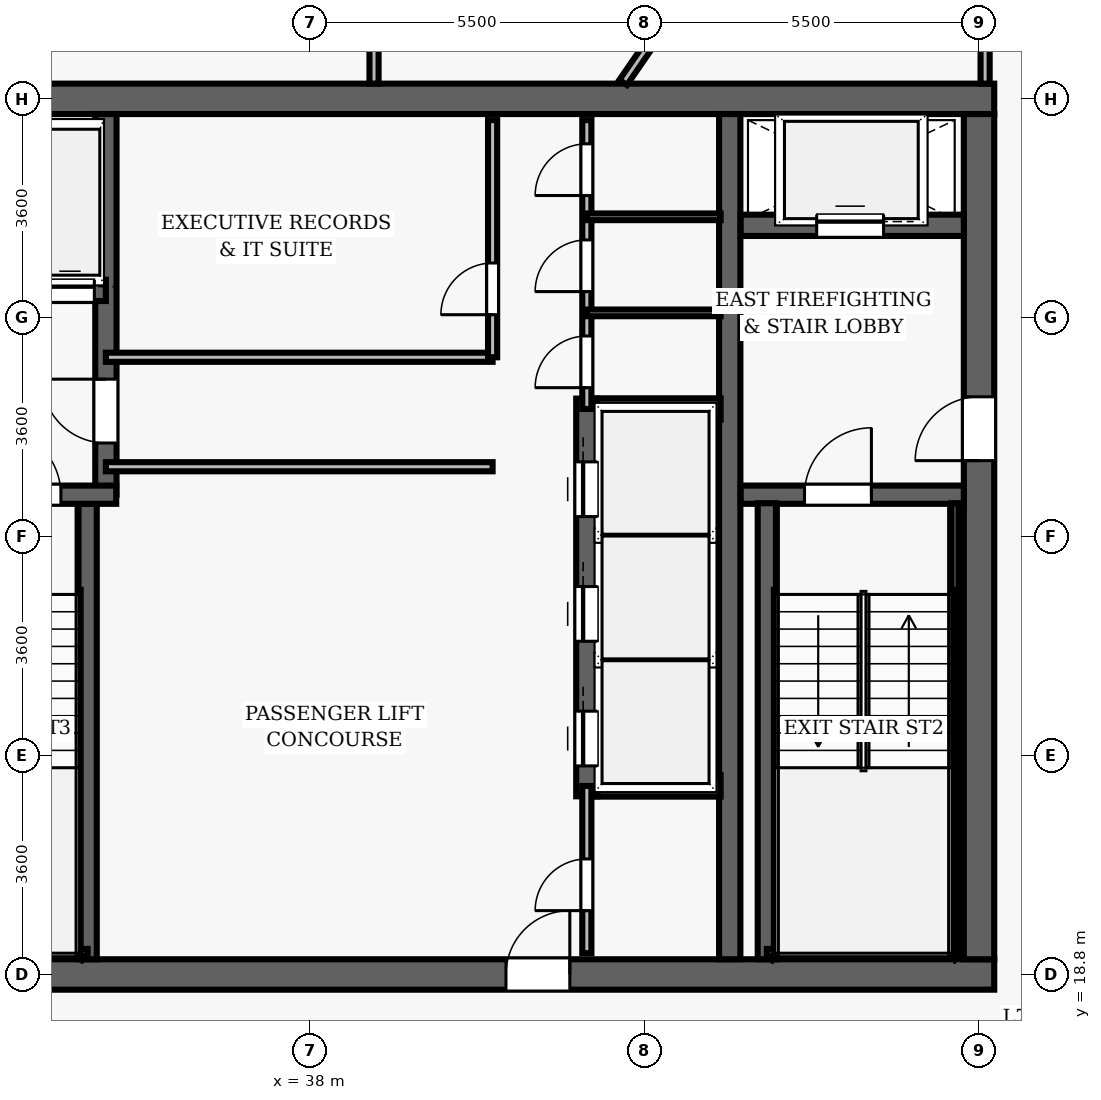
"""IFC4 building model, lengths in metres.
Left out: names, types, materials, properties, quantities, classifications, styles, units other than length and angle.
Written with IfcOpenShell. Run it as: python <this file> out.ifc"""

import sys

from ifc_helpers import new_model, si_unit, direction, frame, frame_2d, origin, place, context, subcontext, project, spatial, rectangle, extrude, element, fill, save


model = new_model("IFC4")
c1 = context("Model", 3, precision=1e-05, world=origin(), true_north=direction((0.0, 1.0)))
c2 = subcontext(c1, "Body", "Model", "MODEL_VIEW")
j1 = project(units=[si_unit("LENGTHUNIT", "METRE"), si_unit("PLANEANGLEUNIT", "RADIAN")], contexts=[c1])
p1 = place(None, origin())
s1 = spatial("IfcSite", under=j1, at=p1, CompositionType="ELEMENT")
p2 = place(p1, origin())
s2 = spatial("IfcBuilding", under=s1, at=p2, CompositionType="ELEMENT")
p3 = place(p2, frame((0.0, 0.0, 299.8)))
s3 = spatial("IfcBuildingStorey", under=s2, at=p3, CompositionType="ELEMENT", Elevation=299.8)
p4 = place(p3, frame((26.75, 18.8, 0.0), z_axis=(0.0, 0.0, 1.0), x_axis=(1.0, 0.0, 0.0)))
e1 = element("IfcWall", 1, at=p4, inside=s3, PredefinedType="SHEAR", context=c2, shape_type="SweptSolid", body=[
    extrude(rectangle(XDim=22.5, YDim=0.5, at=frame_2d((11.25, 0.0))), origin(), (0.0, 0.0, 1.0), 3.85),
])
p5 = place(p4, frame((14.47, 0.0, 0.0)))
e2 = element("IfcOpeningElement", 2, at=p5, cuts=e1, PredefinedType="OPENING", context=c2, shape_type="SweptSolid", body=[
    extrude(rectangle(XDim=1.05, YDim=2.15, at=frame_2d((0.525, 1.075))), frame((0.0, 0.26, 0.0), z_axis=(0.0, -1.0, 0.0), x_axis=(1.0, 0.0, 0.0)), (0.0, 0.0, 1.0), 0.52),
])
p6 = place(p3, frame((26.75, 33.2, 0.0), z_axis=(0.0, 0.0, 1.0), x_axis=(1.0, 0.0, 0.0)))
e3 = element("IfcWall", 3, at=p6, inside=s3, PredefinedType="SHEAR", context=c2, shape_type="SweptSolid", body=[
    extrude(rectangle(XDim=22.5, YDim=0.5, at=frame_2d((11.25, 0.0))), origin(), (0.0, 0.0, 1.0), 3.85),
])
p7 = place(p3, frame((49.0, 19.05, 0.0), z_axis=(0.0, 0.0, 1.0), x_axis=(0.0, 1.0, 0.0)))
e4 = element("IfcWall", 4, at=p7, inside=s3, PredefinedType="SHEAR", context=c2, shape_type="SweptSolid", body=[
    extrude(rectangle(XDim=13.9, YDim=0.5, at=frame_2d((6.95, 0.0))), origin(), (0.0, 0.0, 1.0), 3.85),
])
p8 = place(p7, frame((8.2, 0.0, 0.0)))
e5 = element("IfcOpeningElement", 5, at=p8, cuts=e4, PredefinedType="OPENING", context=c2, shape_type="SweptSolid", body=[
    extrude(rectangle(XDim=1.05, YDim=2.15, at=frame_2d((0.525, 1.075))), frame((0.0, 0.26, 0.0), z_axis=(0.0, -1.0, 0.0), x_axis=(1.0, 0.0, 0.0)), (0.0, 0.0, 1.0), 0.52),
])
p9 = place(p3, frame((44.9, 19.05, 0.0), z_axis=(0.0, 0.0, 1.0), x_axis=(0.0, 1.0, 0.0)))
e6 = element("IfcWall", 6, at=p9, inside=s3, PredefinedType="SHEAR", context=c2, shape_type="SweptSolid", body=[
    extrude(rectangle(XDim=13.9, YDim=0.35, at=frame_2d((6.95, 0.0))), origin(), (0.0, 0.0, 1.0), 3.85),
])
p10 = place(p3, frame((45.08, 26.69, 0.0), z_axis=(0.0, 0.0, 1.0), x_axis=(1.0, 0.0, 0.0)))
e7 = element("IfcWall", 7, at=p10, inside=s3, PredefinedType="SHEAR", context=c2, shape_type="SweptSolid", body=[
    extrude(rectangle(XDim=3.67, YDim=0.3, at=frame_2d((1.835, 0.0))), origin(), (0.0, 0.0, 1.0), 3.85),
])
p11 = place(p10, frame((1.05, 0.0, 0.0)))
e8 = element("IfcOpeningElement", 8, at=p11, cuts=e7, PredefinedType="OPENING", context=c2, shape_type="SweptSolid", body=[
    extrude(rectangle(XDim=1.1, YDim=2.15, at=frame_2d((0.55, 1.075))), frame((0.0, 0.16, 0.0), z_axis=(0.0, -1.0, 0.0), x_axis=(1.0, 0.0, 0.0)), (0.0, 0.0, 1.0), 0.32),
])
p12 = place(p3, frame((45.51, 19.05, 0.0), z_axis=(0.0, 0.0, 1.0), x_axis=(0.0, 1.0, 0.0)))
e9 = element("IfcWall", 9, at=p12, inside=s3, PredefinedType="SHEAR", context=c2, shape_type="SweptSolid", body=[
    extrude(rectangle(XDim=7.5, YDim=0.3, at=frame_2d((3.75, 0.0))), origin(), (0.0, 0.0, 1.0), 3.85),
])
p13 = place(p3, frame((48.605, 19.1, 0.0), z_axis=(0.0, 0.0, 1.0), x_axis=(0.0, 1.0, 0.0)))
e10 = element("IfcWall", 10, at=p13, inside=s3, PredefinedType="SHEAR", context=c2, shape_type="SweptSolid", body=[
    extrude(rectangle(XDim=7.45, YDim=0.12, at=frame_2d((3.725, 0.0))), origin(), (0.0, 0.0, 1.0), 3.85),
])
p14 = place(p3, frame((45.51, 19.16, 0.0), z_axis=(0.0, 0.0, 1.0), x_axis=(1.0, 0.0, 0.0)))
e11 = element("IfcWall", 11, at=p14, inside=s3, PredefinedType="SHEAR", context=c2, shape_type="SweptSolid", body=[
    extrude(rectangle(XDim=3.095, YDim=0.12, at=frame_2d((1.547, 0.0))), origin(), (0.0, 0.0, 1.0), 3.85),
])
p15 = place(p3, frame((45.08, 31.12, 0.0), z_axis=(0.0, 0.0, 1.0), x_axis=(1.0, 0.0, 0.0)))
e12 = element("IfcWall", 12, at=p15, inside=s3, PredefinedType="SHEAR", context=c2, shape_type="SweptSolid", body=[
    extrude(rectangle(XDim=3.67, YDim=0.35, at=frame_2d((1.835, 0.0))), origin(), (0.0, 0.0, 1.0), 3.04),
])
p16 = place(p15, frame((1.25, 0.0, 0.0)))
e13 = element("IfcOpeningElement", 13, at=p16, cuts=e12, PredefinedType="OPENING", context=c2, shape_type="SweptSolid", body=[
    extrude(rectangle(XDim=1.1, YDim=2.15, at=frame_2d((0.55, 1.075))), frame((0.0, 0.185, 0.0), z_axis=(0.0, -1.0, 0.0), x_axis=(1.0, 0.0, 0.0)), (0.0, 0.0, 1.0), 0.37),
])
p17 = place(p3, frame((34.34, 19.05, 0.0), z_axis=(0.0, 0.0, 1.0), x_axis=(0.0, 1.0, 0.0)))
e14 = element("IfcWall", 14, at=p17, inside=s3, PredefinedType="SHEAR", context=c2, shape_type="SweptSolid", body=[
    extrude(rectangle(XDim=7.5, YDim=0.3, at=frame_2d((3.75, 0.0))), origin(), (0.0, 0.0, 1.0), 3.85),
])
p18 = place(p3, frame((34.64, 26.69, 0.0), z_axis=(0.0, 0.0, 1.0), x_axis=(0.0, 1.0, 0.0)))
e15 = element("IfcWall", 15, at=p18, inside=s3, PredefinedType="SHEAR", context=c2, shape_type="SweptSolid", body=[
    extrude(rectangle(XDim=6.26, YDim=0.35, at=frame_2d((3.13, 0.0))), origin(), (0.0, 0.0, 1.0), 3.85),
])
p19 = place(p18, frame((0.85, 0.0, 0.0)))
e16 = element("IfcOpeningElement", 16, at=p19, cuts=e15, PredefinedType="OPENING", context=c2, shape_type="SweptSolid", body=[
    extrude(rectangle(XDim=1.05, YDim=2.15, at=frame_2d((0.525, 1.075))), frame((0.0, 0.185, 0.0), z_axis=(0.0, -1.0, 0.0), x_axis=(1.0, 0.0, 0.0)), (0.0, 0.0, 1.0), 0.37),
])
p20 = place(p3, frame((31.25, 26.69, 0.0), z_axis=(0.0, 0.0, 1.0), x_axis=(1.0, 0.0, 0.0)))
e17 = element("IfcWall", 17, at=p20, inside=s3, PredefinedType="SHEAR", context=c2, shape_type="SweptSolid", body=[
    extrude(rectangle(XDim=3.56, YDim=0.3, at=frame_2d((1.78, 0.0))), origin(), (0.0, 0.0, 1.0), 3.85),
])
p21 = place(p20, frame((1.55, 0.0, 0.0)))
e18 = element("IfcOpeningElement", 18, at=p21, cuts=e17, PredefinedType="OPENING", context=c2, shape_type="SweptSolid", body=[
    extrude(rectangle(XDim=1.1, YDim=2.15, at=frame_2d((0.55, 1.075))), frame((0.0, 0.16, 0.0), z_axis=(0.0, -1.0, 0.0), x_axis=(1.0, 0.0, 0.0)), (0.0, 0.0, 1.0), 0.32),
])
p22 = place(p3, frame((31.3, 19.16, 0.0), z_axis=(0.0, 0.0, 1.0), x_axis=(1.0, 0.0, 0.0)))
e19 = element("IfcWall", 19, at=p22, inside=s3, PredefinedType="SHEAR", context=c2, shape_type="SweptSolid", body=[
    extrude(rectangle(XDim=3.04, YDim=0.12, at=frame_2d((1.52, 0.0))), origin(), (0.0, 0.0, 1.0), 3.85),
])
p23 = place(p3, frame((32.23, 30.05, 0.0), z_axis=(0.0, 0.0, 1.0), x_axis=(1.0, 0.0, 0.0)))
e20 = element("IfcWall", 20, at=p23, inside=s3, PredefinedType="SHEAR", context=c2, shape_type="SweptSolid", body=[
    extrude(rectangle(XDim=2.41, YDim=0.35, at=frame_2d((1.205, 0.0))), origin(), (0.0, 0.0, 1.0), 3.04),
])
p24 = place(p23, frame((0.42, 0.0, 0.0)))
e21 = element("IfcOpeningElement", 21, at=p24, cuts=e20, PredefinedType="OPENING", context=c2, shape_type="SweptSolid", body=[
    extrude(rectangle(XDim=0.8, YDim=2.15, at=frame_2d((0.4, 1.075))), frame((0.0, 0.185, 0.0), z_axis=(0.0, -1.0, 0.0), x_axis=(1.0, 0.0, 0.0)), (0.0, 0.0, 1.0), 0.37),
])
p25 = place(p23, frame((1.42, 0.0, 0.0)))
e22 = element("IfcOpeningElement", 22, at=p25, cuts=e20, PredefinedType="OPENING", context=c2, shape_type="SweptSolid", body=[
    extrude(rectangle(XDim=0.8, YDim=2.15, at=frame_2d((0.4, 1.075))), frame((0.0, 0.185, 0.0), z_axis=(0.0, -1.0, 0.0), x_axis=(1.0, 0.0, 0.0)), (0.0, 0.0, 1.0), 0.37),
])
p26 = place(p3, frame((42.55, 21.73, 0.0), z_axis=(0.0, 0.0, 1.0), x_axis=(0.0, 1.0, 0.0)))
e23 = element("IfcWall", 23, at=p26, inside=s3, PredefinedType="SHEAR", context=c2, shape_type="SweptSolid", body=[
    extrude(rectangle(XDim=6.54, YDim=0.35, at=frame_2d((3.27, 0.0))), origin(), (0.0, 0.0, 1.0), 3.04),
])
p27 = place(p26, frame((0.5, 0.0, 0.0)))
e24 = element("IfcOpeningElement", 24, at=p27, cuts=e23, PredefinedType="OPENING", context=c2, shape_type="SweptSolid", body=[
    extrude(rectangle(XDim=0.9, YDim=2.15, at=frame_2d((0.45, 1.075))), frame((0.0, 0.185, 0.0), z_axis=(0.0, -1.0, 0.0), x_axis=(1.0, 0.0, 0.0)), (0.0, 0.0, 1.0), 0.37),
])
p28 = place(p26, frame((2.55, 0.0, 0.0)))
e25 = element("IfcOpeningElement", 25, at=p28, cuts=e23, PredefinedType="OPENING", context=c2, shape_type="SweptSolid", body=[
    extrude(rectangle(XDim=0.9, YDim=2.15, at=frame_2d((0.45, 1.075))), frame((0.0, 0.185, 0.0), z_axis=(0.0, -1.0, 0.0), x_axis=(1.0, 0.0, 0.0)), (0.0, 0.0, 1.0), 0.37),
])
p29 = place(p26, frame((4.6, 0.0, 0.0)))
e26 = element("IfcOpeningElement", 26, at=p29, cuts=e23, PredefinedType="OPENING", context=c2, shape_type="SweptSolid", body=[
    extrude(rectangle(XDim=0.9, YDim=2.15, at=frame_2d((0.45, 1.075))), frame((0.0, 0.185, 0.0), z_axis=(0.0, -1.0, 0.0), x_axis=(1.0, 0.0, 0.0)), (0.0, 0.0, 1.0), 0.37),
])
for number, where, z_axis, x_axis in (
    (27, (42.72, 21.9, 0.0), (0.0, 0.0, 1.0), (1.0, 0.0, 0.0)),
    (28, (42.72, 28.1, 0.0), (0.0, 0.0, 1.0), (1.0, 0.0, 0.0)),
):
    element("IfcWall", number, at=place(p3, frame(where, z_axis=z_axis, x_axis=x_axis)), inside=s3, PredefinedType="SHEAR", context=c2, shape_type="SweptSolid", body=[
        extrude(rectangle(XDim=2.03, YDim=0.35, at=frame_2d((1.015, 0.0))), origin(), (0.0, 0.0, 1.0), 3.04),
    ])
for number, where, z_axis, x_axis in (
    (29, (34.64, 27.15, 0.0), (0.0, 0.0, 1.0), (1.0, 0.0, 0.0)),
    (30, (34.64, 28.95, 0.0), (0.0, 0.0, 1.0), (1.0, 0.0, 0.0)),
):
    element("IfcWall", number, at=place(p3, frame(where, z_axis=z_axis, x_axis=x_axis)), inside=s3, PredefinedType="PARTITIONING", context=c2, shape_type="SweptSolid", body=[
        extrude(rectangle(XDim=6.36, YDim=0.15, at=frame_2d((3.18, 0.0))), origin(), (0.0, 0.0, 1.0), 3.04),
    ])
p30 = place(p3, frame((41.0, 28.95, 0.0), z_axis=(0.0, 0.0, 1.0), x_axis=(0.0, 1.0, 0.0)))
e31 = element("IfcWall", 31, at=p30, inside=s3, PredefinedType="PARTITIONING", context=c2, shape_type="SweptSolid", body=[
    extrude(rectangle(XDim=3.9, YDim=0.15, at=frame_2d((1.95, 0.0))), origin(), (0.0, 0.0, 1.0), 3.04),
])
p31 = place(p30, frame((0.7, 0.0, 0.0)))
e32 = element("IfcOpeningElement", 32, at=p31, cuts=e31, PredefinedType="OPENING", context=c2, shape_type="SweptSolid", body=[
    extrude(rectangle(XDim=0.85, YDim=2.1, at=frame_2d((0.425, 1.05))), frame((0.0, 0.085, 0.0), z_axis=(0.0, -1.0, 0.0), x_axis=(1.0, 0.0, 0.0)), (0.0, 0.0, 1.0), 0.17),
])
p32 = place(p3, frame((42.55, 28.1, 0.0), z_axis=(0.0, 0.0, 1.0), x_axis=(0.0, 1.0, 0.0)))
e33 = element("IfcWall", 33, at=p32, inside=s3, PredefinedType="PARTITIONING", context=c2, shape_type="SweptSolid", body=[
    extrude(rectangle(XDim=4.75, YDim=0.15, at=frame_2d((2.375, 0.0))), origin(), (0.0, 0.0, 1.0), 3.04),
])
p33 = place(p32, frame((0.35, 0.0, 0.0)))
e34 = element("IfcOpeningElement", 34, at=p33, cuts=e33, PredefinedType="OPENING", context=c2, shape_type="SweptSolid", body=[
    extrude(rectangle(XDim=0.85, YDim=2.1, at=frame_2d((0.425, 1.05))), frame((0.0, 0.085, 0.0), z_axis=(0.0, -1.0, 0.0), x_axis=(1.0, 0.0, 0.0)), (0.0, 0.0, 1.0), 0.17),
])
p34 = place(p32, frame((1.93, 0.0, 0.0)))
e35 = element("IfcOpeningElement", 35, at=p34, cuts=e33, PredefinedType="OPENING", context=c2, shape_type="SweptSolid", body=[
    extrude(rectangle(XDim=0.85, YDim=2.1, at=frame_2d((0.425, 1.05))), frame((0.0, 0.085, 0.0), z_axis=(0.0, -1.0, 0.0), x_axis=(1.0, 0.0, 0.0)), (0.0, 0.0, 1.0), 0.17),
])
p35 = place(p32, frame((3.51, 0.0, 0.0)))
e36 = element("IfcOpeningElement", 36, at=p35, cuts=e33, PredefinedType="OPENING", context=c2, shape_type="SweptSolid", body=[
    extrude(rectangle(XDim=0.85, YDim=2.1, at=frame_2d((0.425, 1.05))), frame((0.0, 0.085, 0.0), z_axis=(0.0, -1.0, 0.0), x_axis=(1.0, 0.0, 0.0)), (0.0, 0.0, 1.0), 0.17),
])
for number, where, z_axis, x_axis in (
    (37, (42.55, 29.68, 0.0), (0.0, 0.0, 1.0), (1.0, 0.0, 0.0)),
    (38, (42.55, 31.26, 0.0), (0.0, 0.0, 1.0), (1.0, 0.0, 0.0)),
):
    element("IfcWall", number, at=place(p3, frame(where, z_axis=z_axis, x_axis=x_axis)), inside=s3, PredefinedType="PARTITIONING", context=c2, shape_type="SweptSolid", body=[
        extrude(rectangle(XDim=2.2, YDim=0.11, at=frame_2d((1.1, 0.0))), origin(), (0.0, 0.0, 1.0), 3.04),
    ])
p36 = place(p3, frame((42.55, 19.15, 0.0), z_axis=(0.0, 0.0, 1.0), x_axis=(0.0, 1.0, 0.0)))
e39 = element("IfcWall", 39, at=p36, inside=s3, PredefinedType="PARTITIONING", context=c2, shape_type="SweptSolid", body=[
    extrude(rectangle(XDim=2.75, YDim=0.15, at=frame_2d((1.375, 0.0))), origin(), (0.0, 0.0, 1.0), 3.04),
])
p37 = place(p36, frame((0.7, 0.0, 0.0)))
e40 = element("IfcOpeningElement", 40, at=p37, cuts=e39, PredefinedType="OPENING", context=c2, shape_type="SweptSolid", body=[
    extrude(rectangle(XDim=0.85, YDim=2.1, at=frame_2d((0.425, 1.05))), frame((0.0, 0.085, 0.0), z_axis=(0.0, -1.0, 0.0), x_axis=(1.0, 0.0, 0.0)), (0.0, 0.0, 1.0), 0.17),
])
p38 = place(p3, frame((49.1, 33.45, 0.0), z_axis=(0.0, 0.0, 1.0), x_axis=(0.0, 1.0, 0.0)))
e41 = element("IfcWall", 41, at=p38, inside=s3, PredefinedType="PARTITIONING", context=c2, shape_type="SweptSolid", body=[
    extrude(rectangle(XDim=7.95, YDim=0.15, at=frame_2d((3.975, 0.0))), origin(), (0.0, 0.0, 1.0), 3.04),
])
p39 = place(p3, frame((39.05, 33.45, 0.0), z_axis=(0.0, 0.0, 1.0), x_axis=(0.0, 1.0, 0.0)))
e42 = element("IfcWall", 42, at=p39, inside=s3, PredefinedType="PARTITIONING", context=c2, shape_type="SweptSolid", body=[
    extrude(rectangle(XDim=6.95, YDim=0.15, at=frame_2d((3.475, 0.0))), origin(), (0.0, 0.0, 1.0), 3.04),
])
p40 = place(p39, frame((0.988, 0.0, 0.0)))
e43 = element("IfcOpeningElement", 43, at=p40, cuts=e42, PredefinedType="OPENING", context=c2, shape_type="SweptSolid", body=[
    extrude(rectangle(XDim=1.5, YDim=2.2, at=frame_2d((0.75, 1.1))), frame((0.0, 0.085, 0.0), z_axis=(0.0, -1.0, 0.0), x_axis=(1.0, 0.0, 0.0)), (0.0, 0.0, 1.0), 0.17),
])
p41 = place(p3, frame((43.148, 33.47, 0.0), z_axis=(0.0, 0.0, 1.0), x_axis=(0.56742949058, 0.82342198976, 0.0)))
e44 = element("IfcWall", 44, at=p41, inside=s3, PredefinedType="PARTITIONING", context=c2, shape_type="SweptSolid", body=[
    extrude(rectangle(XDim=12.673, YDim=0.15, at=frame_2d((6.336, 0.0))), origin(), (0.0, 0.0, 1.0), 3.04),
])
p42 = place(p11, origin())
e45 = element("IfcDoor", 45, at=p42, inside=s3, OperationType="SINGLE_SWING_RIGHT", PredefinedType="DOOR", context=c2, shape_type="SweptSolid", body=[
    extrude(rectangle(XDim=1.1, YDim=2.15, at=frame_2d((0.55, 1.075))), frame((0.0, 0.025, 0.0), z_axis=(0.0, -1.0, 0.0), x_axis=(1.0, 0.0, 0.0)), (0.0, 0.0, 1.0), 0.05),
])
fill(e8, e45)
p43 = place(p8, origin())
e46 = element("IfcDoor", 46, at=p43, inside=s3, OperationType="SINGLE_SWING_LEFT", PredefinedType="DOOR", context=c2, shape_type="SweptSolid", body=[
    extrude(rectangle(XDim=1.05, YDim=2.15, at=frame_2d((0.525, 1.075))), frame((0.0, 0.025, 0.0), z_axis=(0.0, -1.0, 0.0), x_axis=(1.0, 0.0, 0.0)), (0.0, 0.0, 1.0), 0.05),
])
fill(e5, e46)
p44 = place(p21, origin())
e47 = element("IfcDoor", 47, at=p44, inside=s3, OperationType="SINGLE_SWING_LEFT", PredefinedType="DOOR", context=c2, shape_type="SweptSolid", body=[
    extrude(rectangle(XDim=1.1, YDim=2.15, at=frame_2d((0.55, 1.075))), frame((0.0, 0.025, 0.0), z_axis=(0.0, -1.0, 0.0), x_axis=(1.0, 0.0, 0.0)), (0.0, 0.0, 1.0), 0.05),
])
fill(e18, e47)
p45 = place(p5, origin())
e48 = element("IfcDoor", 48, at=p45, inside=s3, OperationType="SINGLE_SWING_RIGHT", PredefinedType="DOOR", context=c2, shape_type="SweptSolid", body=[
    extrude(rectangle(XDim=1.05, YDim=2.15, at=frame_2d((0.525, 1.075))), frame((0.0, 0.025, 0.0), z_axis=(0.0, -1.0, 0.0), x_axis=(1.0, 0.0, 0.0)), (0.0, 0.0, 1.0), 0.05),
])
fill(e2, e48)
p46 = place(p19, origin())
e49 = element("IfcDoor", 49, at=p46, inside=s3, OperationType="SINGLE_SWING_RIGHT", PredefinedType="DOOR", context=c2, shape_type="SweptSolid", body=[
    extrude(rectangle(XDim=1.05, YDim=2.15, at=frame_2d((0.525, 1.075))), frame((0.0, 0.025, 0.0), z_axis=(0.0, -1.0, 0.0), x_axis=(1.0, 0.0, 0.0)), (0.0, 0.0, 1.0), 0.05),
])
fill(e16, e49)
p47 = place(p31, origin())
e50 = element("IfcDoor", 50, at=p47, inside=s3, OperationType="SINGLE_SWING_LEFT", PredefinedType="DOOR", context=c2, shape_type="SweptSolid", body=[
    extrude(rectangle(XDim=0.85, YDim=2.1, at=frame_2d((0.425, 1.05))), frame((0.0, 0.025, 0.0), z_axis=(0.0, -1.0, 0.0), x_axis=(1.0, 0.0, 0.0)), (0.0, 0.0, 1.0), 0.05),
])
fill(e32, e50)
p48 = place(p33, origin())
e51 = element("IfcDoor", 51, at=p48, inside=s3, OperationType="SINGLE_SWING_LEFT", PredefinedType="DOOR", context=c2, shape_type="SweptSolid", body=[
    extrude(rectangle(XDim=0.85, YDim=2.1, at=frame_2d((0.425, 1.05))), frame((0.0, 0.025, 0.0), z_axis=(0.0, -1.0, 0.0), x_axis=(1.0, 0.0, 0.0)), (0.0, 0.0, 1.0), 0.05),
])
fill(e34, e51)
p49 = place(p34, origin())
e52 = element("IfcDoor", 52, at=p49, inside=s3, OperationType="SINGLE_SWING_LEFT", PredefinedType="DOOR", context=c2, shape_type="SweptSolid", body=[
    extrude(rectangle(XDim=0.85, YDim=2.1, at=frame_2d((0.425, 1.05))), frame((0.0, 0.025, 0.0), z_axis=(0.0, -1.0, 0.0), x_axis=(1.0, 0.0, 0.0)), (0.0, 0.0, 1.0), 0.05),
])
fill(e35, e52)
p50 = place(p35, origin())
e53 = element("IfcDoor", 53, at=p50, inside=s3, OperationType="SINGLE_SWING_LEFT", PredefinedType="DOOR", context=c2, shape_type="SweptSolid", body=[
    extrude(rectangle(XDim=0.85, YDim=2.1, at=frame_2d((0.425, 1.05))), frame((0.0, 0.025, 0.0), z_axis=(0.0, -1.0, 0.0), x_axis=(1.0, 0.0, 0.0)), (0.0, 0.0, 1.0), 0.05),
])
fill(e36, e53)
p51 = place(p37, origin())
e54 = element("IfcDoor", 54, at=p51, inside=s3, OperationType="SINGLE_SWING_LEFT", PredefinedType="DOOR", context=c2, shape_type="SweptSolid", body=[
    extrude(rectangle(XDim=0.85, YDim=2.1, at=frame_2d((0.425, 1.05))), frame((0.0, 0.025, 0.0), z_axis=(0.0, -1.0, 0.0), x_axis=(1.0, 0.0, 0.0)), (0.0, 0.0, 1.0), 0.05),
])
fill(e40, e54)
p52 = place(p27, origin())
e55 = element("IfcDoor", 55, at=p52, inside=s3, OperationType="SLIDING_TO_LEFT", PredefinedType="DOOR", context=c2, shape_type="SweptSolid", body=[
    extrude(rectangle(XDim=0.9, YDim=2.15, at=frame_2d((0.45, 1.075))), frame((0.0, 0.025, 0.0), z_axis=(0.0, -1.0, 0.0), x_axis=(1.0, 0.0, 0.0)), (0.0, 0.0, 1.0), 0.05),
])
fill(e24, e55)
p53 = place(p28, origin())
e56 = element("IfcDoor", 56, at=p53, inside=s3, OperationType="SLIDING_TO_LEFT", PredefinedType="DOOR", context=c2, shape_type="SweptSolid", body=[
    extrude(rectangle(XDim=0.9, YDim=2.15, at=frame_2d((0.45, 1.075))), frame((0.0, 0.025, 0.0), z_axis=(0.0, -1.0, 0.0), x_axis=(1.0, 0.0, 0.0)), (0.0, 0.0, 1.0), 0.05),
])
fill(e25, e56)
p54 = place(p29, origin())
e57 = element("IfcDoor", 57, at=p54, inside=s3, OperationType="SLIDING_TO_LEFT", PredefinedType="DOOR", context=c2, shape_type="SweptSolid", body=[
    extrude(rectangle(XDim=0.9, YDim=2.15, at=frame_2d((0.45, 1.075))), frame((0.0, 0.025, 0.0), z_axis=(0.0, -1.0, 0.0), x_axis=(1.0, 0.0, 0.0)), (0.0, 0.0, 1.0), 0.05),
])
fill(e26, e57)
p55 = place(p16, origin())
e58 = element("IfcDoor", 58, at=p55, inside=s3, OperationType="SLIDING_TO_LEFT", PredefinedType="DOOR", context=c2, shape_type="SweptSolid", body=[
    extrude(rectangle(XDim=1.1, YDim=2.15, at=frame_2d((0.55, 1.075))), frame((0.0, 0.025, 0.0), z_axis=(0.0, -1.0, 0.0), x_axis=(1.0, 0.0, 0.0)), (0.0, 0.0, 1.0), 0.05),
])
fill(e13, e58)
p56 = place(p25, origin())
e59 = element("IfcDoor", 59, at=p56, inside=s3, OperationType="SLIDING_TO_LEFT", PredefinedType="DOOR", context=c2, shape_type="SweptSolid", body=[
    extrude(rectangle(XDim=0.8, YDim=2.15, at=frame_2d((0.4, 1.075))), frame((0.0, 0.025, 0.0), z_axis=(0.0, -1.0, 0.0), x_axis=(1.0, 0.0, 0.0)), (0.0, 0.0, 1.0), 0.05),
])
fill(e22, e59)
save(model, sys.argv[1])
